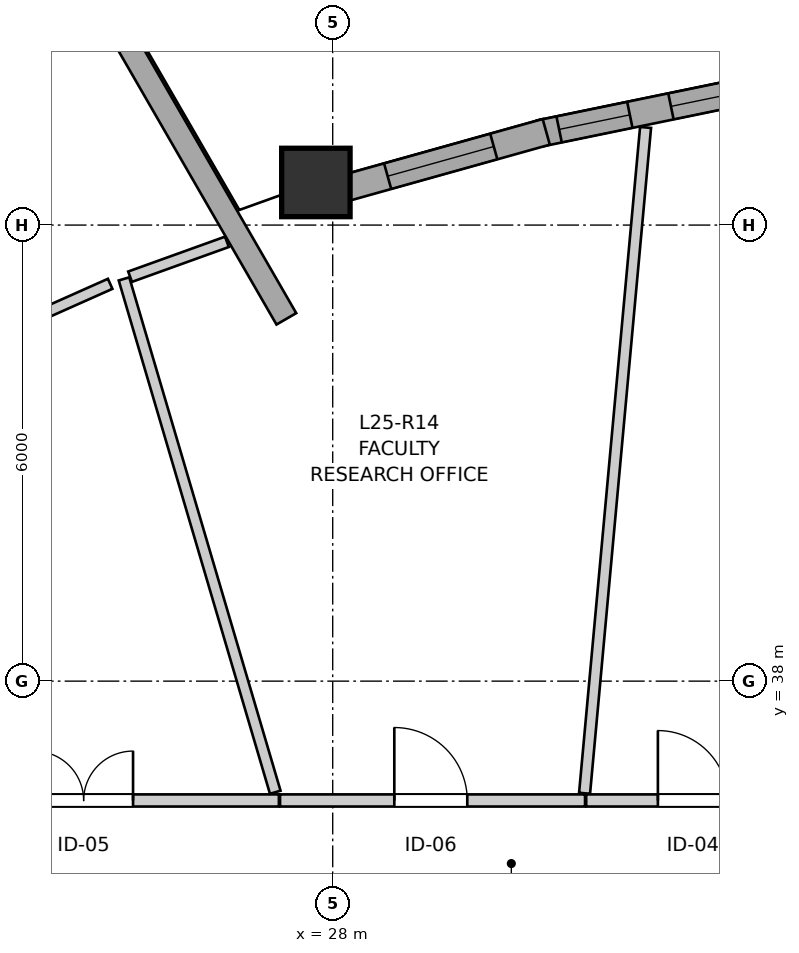
"""IFC4 building model, lengths in metres.
Left out: names, types, materials, properties, quantities, classifications, styles, units other than length and angle.
Written with IfcOpenShell. Run it as: python <this file> out.ifc"""

import sys

from ifc_helpers import new_model, si_unit, direction, frame, frame_2d, origin, origin_2d, place, context, subcontext, project, spatial, rectangle, extrude, source, transform, mapped, element, fill, save


model = new_model("IFC4")
c1 = context("Model", 3, precision=1e-05, world=origin(), true_north=direction((0.0, 1.0)))
c2 = subcontext(c1, "Body", "Model", "MODEL_VIEW")
j1 = project(units=[si_unit("LENGTHUNIT", "METRE"), si_unit("PLANEANGLEUNIT", "RADIAN")], contexts=[c1])
p1 = place(None, origin())
s1 = spatial("IfcSite", under=j1, at=p1, CompositionType="ELEMENT")
p2 = place(p1, origin())
s2 = spatial("IfcBuilding", under=s1, at=p2, CompositionType="ELEMENT")
p3 = place(p2, frame((0.0, 0.0, 86.4)))
s3 = spatial("IfcBuildingStorey", under=s2, at=p3, CompositionType="ELEMENT", Elevation=86.4)
m1 = source(origin(), c2, "Body", "SweptSolid", [
    extrude(rectangle(XDim=0.9, YDim=0.9, at=origin_2d()), origin(), (0.0, 0.0, 1.0), 2.95),
])
p4 = place(p3, frame((27.779, 44.561, 0.0), z_axis=(0.0, 0.0, 1.0), x_axis=(1.0, 0.0, 0.0)))
e1 = element("IfcColumn", 1, at=p4, inside=s3, PredefinedType="COLUMN", context=c2, shape_type="MappedRepresentation", body=[
    mapped(m1, transform((0.0, 0.0, 0.0), x_axis=(1.0, 0.0, 0.0), y_axis=(0.0, 1.0, 0.0), z_axis=(0.0, 0.0, 1.0), scale=1.0)),
])
p5 = place(p3, frame((33.803, 45.84, 0.0), z_axis=(0.0, 0.0, 1.0), x_axis=(-0.97943222174, -0.201773444777, 0.0)))
e2 = element("IfcWall", 2, at=p5, inside=s3, PredefinedType="SOLIDWALL", context=c2, shape_type="SweptSolid", body=[
    extrude(rectangle(XDim=3.144, YDim=0.35, at=frame_2d((1.572, 0.0))), origin(), (0.0, 0.0, 1.0), 2.48),
])
p6 = place(p5, frame((0.431, 0.0, 0.82)))
e3 = element("IfcOpeningElement", 3, at=p6, cuts=e2, PredefinedType="OPENING", context=c2, shape_type="SweptSolid", body=[
    extrude(rectangle(XDim=0.95, YDim=1.35, at=frame_2d((0.475, 0.675))), frame((0.0, 0.185, 0.0), z_axis=(0.0, -1.0, 0.0), x_axis=(1.0, 0.0, 0.0)), (0.0, 0.0, 1.0), 0.37),
])
p7 = place(p5, frame((1.933, 0.0, 0.82)))
e4 = element("IfcOpeningElement", 4, at=p7, cuts=e2, PredefinedType="OPENING", context=c2, shape_type="SweptSolid", body=[
    extrude(rectangle(XDim=0.95, YDim=1.35, at=frame_2d((0.475, 0.675))), frame((0.0, 0.185, 0.0), z_axis=(0.0, -1.0, 0.0), x_axis=(1.0, 0.0, 0.0)), (0.0, 0.0, 1.0), 0.37),
])
p8 = place(p3, frame((30.809, 45.227, 0.0), z_axis=(0.0, 0.0, 1.0), x_axis=(-0.963041637143, -0.269352566591, 0.0)))
e5 = element("IfcWall", 5, at=p8, inside=s3, PredefinedType="SOLIDWALL", context=c2, shape_type="SweptSolid", body=[
    extrude(rectangle(XDim=2.873, YDim=0.35, at=frame_2d((1.437, 0.0))), origin(), (0.0, 0.0, 1.0), 2.48),
])
p9 = place(p8, frame((0.717, 0.0, 0.82)))
e6 = element("IfcOpeningElement", 6, at=p9, cuts=e5, PredefinedType="OPENING", context=c2, shape_type="SweptSolid", body=[
    extrude(rectangle(XDim=1.45, YDim=1.25, at=frame_2d((0.725, 0.625))), frame((0.0, 0.185, 0.0), z_axis=(0.0, -1.0, 0.0), x_axis=(1.0, 0.0, 0.0)), (0.0, 0.0, 1.0), 0.37),
])
p10 = place(p3, frame((27.39, 42.766, 0.0), z_axis=(0.0, 0.0, 1.0), x_axis=(-0.499999403898, 0.866025747944, 0.0)))
e7 = element("IfcWall", 7, at=p10, inside=s3, PredefinedType="SOLIDWALL", context=c2, shape_type="SweptSolid", body=[
    extrude(rectangle(XDim=20.603, YDim=0.3, at=frame_2d((10.302, 0.0))), origin(), (0.0, 0.0, 1.0), 2.13),
])
p11 = place(p3, frame((22.17, 36.43, 0.0), z_axis=(0.0, 0.0, 1.0), x_axis=(1.0, 0.0, 0.0)))
e8 = element("IfcWall", 8, at=p11, inside=s3, PredefinedType="PARTITIONING", context=c2, shape_type="SweptSolid", body=[
    extrude(rectangle(XDim=5.122, YDim=0.16, at=frame_2d((2.561, 0.0))), origin(), (0.0, 0.0, 1.0), 2.588),
])
p12 = place(p11, frame((1.903, 0.0, 0.0)))
e9 = element("IfcOpeningElement", 9, at=p12, cuts=e8, PredefinedType="OPENING", context=c2, shape_type="SweptSolid", body=[
    extrude(rectangle(XDim=1.3, YDim=2.1, at=frame_2d((0.65, 1.05))), frame((0.0, 0.09, 0.0), z_axis=(0.0, -1.0, 0.0), x_axis=(1.0, 0.0, 0.0)), (0.0, 0.0, 1.0), 0.18),
])
p13 = place(p3, frame((27.307, 36.43, 0.0), z_axis=(0.0, 0.0, 1.0), x_axis=(1.0, 0.0, 0.0)))
e10 = element("IfcWall", 10, at=p13, inside=s3, PredefinedType="PARTITIONING", context=c2, shape_type="SweptSolid", body=[
    extrude(rectangle(XDim=4.013, YDim=0.16, at=frame_2d((2.007, 0.0))), origin(), (0.0, 0.0, 1.0), 2.95),
])
p14 = place(p13, frame((1.503, 0.0, 0.0)))
e11 = element("IfcOpeningElement", 11, at=p14, cuts=e10, PredefinedType="OPENING", context=c2, shape_type="SweptSolid", body=[
    extrude(rectangle(XDim=0.96, YDim=2.1, at=frame_2d((0.48, 1.05))), frame((0.0, 0.09, 0.0), z_axis=(0.0, -1.0, 0.0), x_axis=(1.0, 0.0, 0.0)), (0.0, 0.0, 1.0), 0.18),
])
p15 = place(p3, frame((22.377, 42.026, 0.0), z_axis=(0.0, 0.0, 1.0), x_axis=(0.913387960111, 0.407090204162, 0.0)))
e12 = element("IfcWall", 12, at=p15, inside=s3, PredefinedType="PARTITIONING", context=c2, shape_type="SweptSolid", body=[
    extrude(rectangle(XDim=2.951, YDim=0.145, at=frame_2d((1.475, 0.0))), origin(), (0.0, 0.0, 1.0), 2.468),
])
p16 = place(p15, frame((0.995, 0.0, 0.0)))
e13 = element("IfcOpeningElement", 13, at=p16, cuts=e12, PredefinedType="OPENING", context=c2, shape_type="SweptSolid", body=[
    extrude(rectangle(XDim=0.96, YDim=2.1, at=frame_2d((0.48, 1.05))), frame((0.0, 0.083, 0.0), z_axis=(0.0, -1.0, 0.0), x_axis=(1.0, 0.0, 0.0)), (0.0, 0.0, 1.0), 0.165),
])
p17 = place(p3, frame((31.335, 36.43, 0.0), z_axis=(0.0, 0.0, 1.0), x_axis=(1.0, 0.0, 0.0)))
e14 = element("IfcWall", 14, at=p17, inside=s3, PredefinedType="PARTITIONING", context=c2, shape_type="SweptSolid", body=[
    extrude(rectangle(XDim=2.806, YDim=0.16, at=frame_2d((1.403, 0.0))), origin(), (0.0, 0.0, 1.0), 2.95),
])
p18 = place(p17, frame((0.944, 0.0, 0.0)))
e15 = element("IfcOpeningElement", 15, at=p18, cuts=e14, PredefinedType="OPENING", context=c2, shape_type="SweptSolid", body=[
    extrude(rectangle(XDim=0.92, YDim=2.1, at=frame_2d((0.46, 1.05))), frame((0.0, 0.09, 0.0), z_axis=(0.0, -1.0, 0.0), x_axis=(1.0, 0.0, 0.0)), (0.0, 0.0, 1.0), 0.18),
])
p19 = place(p3, frame((31.314, 36.525, 0.0), z_axis=(0.0, 0.0, 1.0), x_axis=(0.091226381691, 0.995830179942, 0.0)))
e16 = element("IfcWall", 16, at=p19, inside=s3, PredefinedType="PARTITIONING", context=c2, shape_type="SweptSolid", body=[
    extrude(rectangle(XDim=8.797, YDim=0.145, at=frame_2d((4.398, 0.0))), origin(), (0.0, 0.0, 1.0), 2.95),
])
p20 = place(p3, frame((25.254, 43.292, 0.0), z_axis=(0.0, 0.0, 1.0), x_axis=(0.282661880608, -0.959219610543, 0.0)))
e17 = element("IfcWall", 17, at=p20, inside=s3, PredefinedType="PARTITIONING", context=c2, shape_type="SweptSolid", body=[
    extrude(rectangle(XDim=7.041, YDim=0.145, at=frame_2d((3.521, 0.0))), origin(), (0.0, 0.0, 1.0), 2.95),
])
p21 = place(p3, frame((25.334, 43.321, 0.0), z_axis=(0.0, 0.0, 1.0), x_axis=(0.940956330278, 0.3385279671, 0.0)))
e18 = element("IfcWall", 18, at=p21, inside=s3, PredefinedType="PARTITIONING", context=c2, shape_type="SweptSolid", body=[
    extrude(rectangle(XDim=1.354, YDim=0.145, at=frame_2d((0.677, 0.0))), origin(), (0.0, 0.0, 1.0), 2.468),
])
m2 = source(origin(), c2, "Body", "SweptSolid", [
    extrude(rectangle(XDim=0.95, YDim=1.35, at=frame_2d((0.475, 0.675))), frame((0.0, 0.03, 0.0), z_axis=(0.0, -1.0, 0.0), x_axis=(1.0, 0.0, 0.0)), (0.0, 0.0, 1.0), 0.06),
])
p22 = place(p6, origin())
e19 = element("IfcWindow", 19, at=p22, inside=s3, PartitioningType="SINGLE_PANEL", PredefinedType="WINDOW", context=c2, shape_type="MappedRepresentation", body=[
    mapped(m2, transform((0.0, 0.0, 0.0), x_axis=(1.0, 0.0, 0.0), y_axis=(0.0, 1.0, 0.0), z_axis=(0.0, 0.0, 1.0), scale=1.0)),
])
fill(e3, e19)
p23 = place(p7, origin())
e20 = element("IfcWindow", 20, at=p23, inside=s3, PartitioningType="SINGLE_PANEL", PredefinedType="WINDOW", context=c2, shape_type="MappedRepresentation", body=[
    mapped(m2, transform((0.0, 0.0, 0.0), x_axis=(1.0, 0.0, 0.0), y_axis=(0.0, 1.0, 0.0), z_axis=(0.0, 0.0, 1.0), scale=1.0)),
])
fill(e4, e20)
m3 = source(origin(), c2, "Body", "SweptSolid", [
    extrude(rectangle(XDim=1.45, YDim=1.25, at=frame_2d((0.725, 0.625))), frame((0.0, 0.03, 0.0), z_axis=(0.0, -1.0, 0.0), x_axis=(1.0, 0.0, 0.0)), (0.0, 0.0, 1.0), 0.06),
])
p24 = place(p9, origin())
e21 = element("IfcWindow", 21, at=p24, inside=s3, PartitioningType="SINGLE_PANEL", PredefinedType="WINDOW", context=c2, shape_type="MappedRepresentation", body=[
    mapped(m3, transform((0.0, 0.0, 0.0), x_axis=(1.0, 0.0, 0.0), y_axis=(0.0, 1.0, 0.0), z_axis=(0.0, 0.0, 1.0), scale=1.0)),
])
fill(e6, e21)
m4 = source(origin(), c2, "Body", "SweptSolid", [
    extrude(rectangle(XDim=1.3, YDim=2.1, at=frame_2d((0.65, 1.05))), frame((0.0, 0.025, 0.0), z_axis=(0.0, -1.0, 0.0), x_axis=(1.0, 0.0, 0.0)), (0.0, 0.0, 1.0), 0.05),
])
p25 = place(p12, origin())
e22 = element("IfcDoor", 22, at=p25, inside=s3, OperationType="DOUBLE_DOOR_SINGLE_SWING", PredefinedType="DOOR", context=c2, shape_type="MappedRepresentation", body=[
    mapped(m4, transform((0.0, 0.0, 0.0), x_axis=(1.0, 0.0, 0.0), y_axis=(0.0, 1.0, 0.0), z_axis=(0.0, 0.0, 1.0), scale=1.0)),
])
fill(e9, e22)
m5 = source(origin(), c2, "Body", "SweptSolid", [
    extrude(rectangle(XDim=0.96, YDim=2.1, at=frame_2d((0.48, 1.05))), frame((0.0, 0.025, 0.0), z_axis=(0.0, -1.0, 0.0), x_axis=(1.0, 0.0, 0.0)), (0.0, 0.0, 1.0), 0.05),
])
p26 = place(p14, origin())
e23 = element("IfcDoor", 23, at=p26, inside=s3, OperationType="SINGLE_SWING_LEFT", PredefinedType="DOOR", context=c2, shape_type="MappedRepresentation", body=[
    mapped(m5, transform((0.0, 0.0, 0.0), x_axis=(1.0, 0.0, 0.0), y_axis=(0.0, 1.0, 0.0), z_axis=(0.0, 0.0, 1.0), scale=1.0)),
])
fill(e11, e23)
m6 = source(origin(), c2, "Body", "SweptSolid", [
    extrude(rectangle(XDim=0.92, YDim=2.1, at=frame_2d((0.46, 1.05))), frame((0.0, 0.025, 0.0), z_axis=(0.0, -1.0, 0.0), x_axis=(1.0, 0.0, 0.0)), (0.0, 0.0, 1.0), 0.05),
])
p27 = place(p18, origin())
e24 = element("IfcDoor", 24, at=p27, inside=s3, OperationType="SINGLE_SWING_LEFT", PredefinedType="DOOR", context=c2, shape_type="MappedRepresentation", body=[
    mapped(m6, transform((0.0, 0.0, 0.0), x_axis=(1.0, 0.0, 0.0), y_axis=(0.0, 1.0, 0.0), z_axis=(0.0, 0.0, 1.0), scale=1.0)),
])
fill(e15, e24)
save(model, sys.argv[1])
